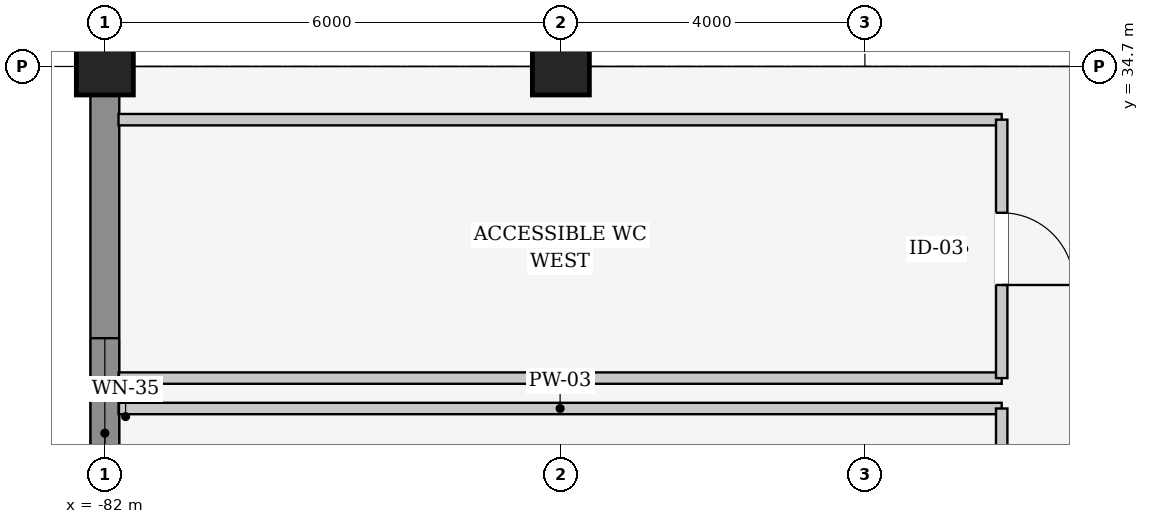
"""IFC4 building model, lengths in metres.
Left out: names, types, materials, properties, quantities, classifications, styles, units other than length and angle.
Written with IfcOpenShell. Run it as: python <this file> out.ifc"""

import sys

from ifc_helpers import new_model, si_unit, direction, frame, frame_2d, origin, origin_2d, place, context, subcontext, project, spatial, rectangle, extrude, element, fill, save


model = new_model("IFC4")
c1 = context("Model", 3, precision=1e-05, world=origin(), true_north=direction((0.0, 1.0)))
c2 = subcontext(c1, "Body", "Model", "MODEL_VIEW")
j1 = project(units=[si_unit("LENGTHUNIT", "METRE"), si_unit("PLANEANGLEUNIT", "RADIAN")], contexts=[c1])
p1 = place(None, origin())
s1 = spatial("IfcSite", under=j1, at=p1, CompositionType="ELEMENT")
p2 = place(p1, origin())
s2 = spatial("IfcBuilding", under=s1, at=p2, CompositionType="ELEMENT")
p3 = place(p2, frame((0.0, 0.0, 16.2)))
s3 = spatial("IfcBuildingStorey", under=s2, at=p3, CompositionType="ELEMENT", Elevation=16.2)
for number, where, z_axis, x_axis in (
    (1, (-82.0, 34.7, 0.0), (0.0, 0.0, 1.0), (1.0, 0.0, 0.0)),
    (2, (-76.0, 34.7, 0.0), (0.0, 0.0, 1.0), (1.0, 0.0, 0.0)),
):
    element("IfcColumn", number, at=place(p3, frame(where, z_axis=z_axis, x_axis=x_axis)), inside=s3, PredefinedType="COLUMN", context=c2, shape_type="SweptSolid", body=[
        extrude(rectangle(XDim=0.75, YDim=0.75, at=origin_2d()), origin(), (0.0, 0.0, 1.0), 4.8),
    ])
p4 = place(p3, frame((-82.0, 25.407, 0.0), z_axis=(0.0, 0.0, 1.0), x_axis=(0.0, 1.0, 0.0)))
e3 = element("IfcWall", 3, at=p4, inside=s3, PredefinedType="SOLIDWALL", context=c2, shape_type="SweptSolid", body=[
    extrude(rectangle(XDim=8.936, YDim=0.38, at=frame_2d((4.468, 0.0))), origin(), (0.0, 0.0, 1.0), 3.76),
])
p5 = place(p4, frame((3.218, 0.0, 0.9)))
e4 = element("IfcOpeningElement", 4, at=p5, cuts=e3, PredefinedType="OPENING", context=c2, shape_type="SweptSolid", body=[
    extrude(rectangle(XDim=2.5, YDim=2.0, at=frame_2d((1.25, 1.0))), frame((0.0, 0.2, 0.0), z_axis=(0.0, -1.0, 0.0), x_axis=(1.0, 0.0, 0.0)), (0.0, 0.0, 1.0), 0.4),
])
p6 = place(p3, frame((-81.82, 30.2, 0.0), z_axis=(0.0, 0.0, 1.0), x_axis=(1.0, 0.0, 0.0)))
e5 = element("IfcWall", 5, at=p6, inside=s3, PredefinedType="PARTITIONING", context=c2, shape_type="SweptSolid", body=[
    extrude(rectangle(XDim=11.62, YDim=0.15, at=frame_2d((5.81, 0.0))), origin(), (0.0, 0.0, 1.0), 3.962),
])
p7 = place(p3, frame((-70.2, 30.2, 0.0), z_axis=(0.0, 0.0, 1.0), x_axis=(0.0, -1.0, 0.0)))
e6 = element("IfcWall", 6, at=p7, inside=s3, PredefinedType="PARTITIONING", context=c2, shape_type="SweptSolid", body=[
    extrude(rectangle(XDim=5.0, YDim=0.15, at=frame_2d((2.5, 0.0))), origin(), (0.0, 0.0, 1.0), 3.545),
])
p8 = place(p7, frame((2.025, 0.0, 0.0)))
e7 = element("IfcOpeningElement", 7, at=p8, cuts=e6, PredefinedType="OPENING", context=c2, shape_type="SweptSolid", body=[
    extrude(rectangle(XDim=0.95, YDim=2.15, at=frame_2d((0.475, 1.075))), frame((0.0, 0.085, 0.0), z_axis=(0.0, -1.0, 0.0), x_axis=(1.0, 0.0, 0.0)), (0.0, 0.0, 1.0), 0.17),
])
for number, where, z_axis, x_axis in (
    (8, (-81.82, 34.0, 0.0), (0.0, 0.0, 1.0), (1.0, 0.0, 0.0)),
    (9, (-70.2, 30.6, 0.0), (0.0, 0.0, 1.0), (-1.0, 0.0, 0.0)),
):
    element("IfcWall", number, at=place(p3, frame(where, z_axis=z_axis, x_axis=x_axis)), inside=s3, PredefinedType="PARTITIONING", context=c2, shape_type="SweptSolid", body=[
        extrude(rectangle(XDim=11.62, YDim=0.15, at=frame_2d((5.81, 0.0))), origin(), (0.0, 0.0, 1.0), 3.962),
    ])
p9 = place(p3, frame((-70.2, 34.0, 0.0), z_axis=(0.0, 0.0, 1.0), x_axis=(0.0, -1.0, 0.0)))
e10 = element("IfcWall", 10, at=p9, inside=s3, PredefinedType="PARTITIONING", context=c2, shape_type="SweptSolid", body=[
    extrude(rectangle(XDim=3.4, YDim=0.15, at=frame_2d((1.7, 0.0))), origin(), (0.0, 0.0, 1.0), 4.44),
])
p10 = place(p9, frame((1.225, 0.0, 0.0)))
e11 = element("IfcOpeningElement", 11, at=p10, cuts=e10, PredefinedType="OPENING", context=c2, shape_type="SweptSolid", body=[
    extrude(rectangle(XDim=0.95, YDim=2.15, at=frame_2d((0.475, 1.075))), frame((0.0, 0.085, 0.0), z_axis=(0.0, -1.0, 0.0), x_axis=(1.0, 0.0, 0.0)), (0.0, 0.0, 1.0), 0.17),
])
p11 = place(p5, origin())
e12 = element("IfcWindow", 12, at=p11, inside=s3, PartitioningType="SINGLE_PANEL", PredefinedType="WINDOW", context=c2, shape_type="SweptSolid", body=[
    extrude(rectangle(XDim=2.5, YDim=2.0, at=frame_2d((1.25, 1.0))), frame((0.0, 0.03, 0.0), z_axis=(0.0, -1.0, 0.0), x_axis=(1.0, 0.0, 0.0)), (0.0, 0.0, 1.0), 0.06),
])
fill(e4, e12)
p12 = place(p10, origin())
e13 = element("IfcDoor", 13, at=p12, inside=s3, OperationType="SINGLE_SWING_RIGHT", PredefinedType="DOOR", context=c2, shape_type="SweptSolid", body=[
    extrude(rectangle(XDim=0.95, YDim=2.15, at=frame_2d((0.475, 1.075))), frame((0.0, 0.025, 0.0), z_axis=(0.0, -1.0, 0.0), x_axis=(1.0, 0.0, 0.0)), (0.0, 0.0, 1.0), 0.05),
])
fill(e11, e13)
save(model, sys.argv[1])
